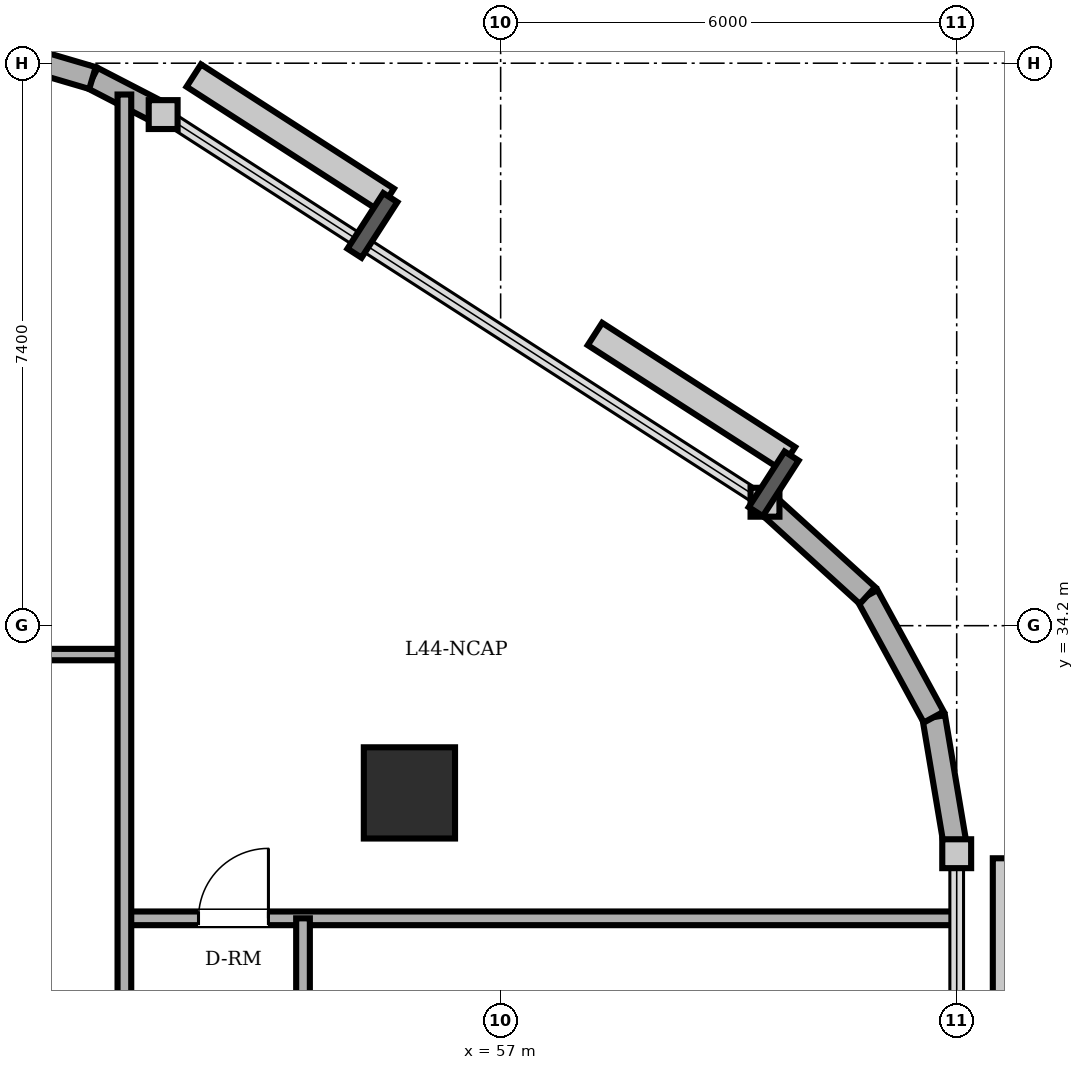
"""IFC4 building model, lengths in metres.
Left out: names, types, materials, properties, quantities, classifications, styles, units other than length and angle.
Written with IfcOpenShell. Run it as: python <this file> out.ifc"""

import sys

from ifc_helpers import new_model, si_unit, direction, frame, frame_2d, origin, origin_2d, place, context, subcontext, project, spatial, rectangle, circle, extrude, element, fill, save


model = new_model("IFC4")
c1 = context("Model", 3, precision=1e-05, world=origin(), true_north=direction((0.0, 1.0)))
c2 = subcontext(c1, "Body", "Model", "MODEL_VIEW")
j1 = project(units=[si_unit("LENGTHUNIT", "METRE"), si_unit("PLANEANGLEUNIT", "RADIAN")], contexts=[c1])
p1 = place(None, origin())
s1 = spatial("IfcSite", under=j1, at=p1, CompositionType="ELEMENT")
p2 = place(p1, origin())
s2 = spatial("IfcBuilding", under=s1, at=p2, CompositionType="ELEMENT")
p3 = place(p2, frame((0.0, 0.0, 169.0)))
s3 = spatial("IfcBuildingStorey", under=s2, at=p3, CompositionType="ELEMENT", Elevation=169.0)
p4 = place(p3, frame((55.8, 32.0, 0.0), z_axis=(0.0, 0.0, 1.0), x_axis=(1.0, 0.0, 0.0)))
e1 = element("IfcColumn", 1, at=p4, inside=s3, PredefinedType="COLUMN", context=c2, shape_type="SweptSolid", body=[
    extrude(circle(Radius=0.6, at=origin_2d()), origin(), (0.0, 0.0, 1.0), 3.6),
])
p5 = place(p3, frame((63.0, 31.2, 0.0), z_axis=(0.0, 0.0, 1.0), x_axis=(-0.165724081207, 0.986172159873, 0.0)))
e2 = element("IfcWall", 2, at=p5, inside=s3, PredefinedType="SOLIDWALL", context=c2, shape_type="SweptSolid", body=[
    extrude(rectangle(XDim=1.822, YDim=0.3, at=frame_2d((0.911, 0.0))), origin(), (0.0, 0.0, 1.0), 3.4),
])
p6 = place(p3, frame((62.698, 32.997, 0.0), z_axis=(0.0, 0.0, 1.0), x_axis=(-0.478608030646, 0.878028674362, 0.0)))
e3 = element("IfcWall", 3, at=p6, inside=s3, PredefinedType="SOLIDWALL", context=c2, shape_type="SweptSolid", body=[
    extrude(rectangle(XDim=1.822, YDim=0.3, at=frame_2d((0.911, 0.0))), origin(), (0.0, 0.0, 1.0), 3.4),
])
p7 = place(p3, frame((61.826, 34.597, 0.0), z_axis=(0.0, 0.0, 1.0), x_axis=(-0.73947929393, 0.673179302897, 0.0)))
e4 = element("IfcWall", 4, at=p7, inside=s3, PredefinedType="SOLIDWALL", context=c2, shape_type="SweptSolid", body=[
    extrude(rectangle(XDim=1.823, YDim=0.3, at=frame_2d((0.911, 0.0))), origin(), (0.0, 0.0, 1.0), 3.4),
])
p8 = place(p3, frame((52.56, 40.924, 0.0), z_axis=(0.0, 0.0, 1.0), x_axis=(-0.888283247196, 0.459296062198, 0.0)))
e5 = element("IfcWall", 5, at=p8, inside=s3, PredefinedType="SOLIDWALL", context=c2, shape_type="SweptSolid", body=[
    extrude(rectangle(XDim=1.047, YDim=0.3, at=frame_2d((0.523, 0.0))), origin(), (0.0, 0.0, 1.0), 3.4),
])
p9 = place(p3, frame((51.63, 41.405, 0.0), z_axis=(0.0, 0.0, 1.0), x_axis=(-0.959528674476, 0.281610942363, 0.0)))
e6 = element("IfcWall", 6, at=p9, inside=s3, PredefinedType="SOLIDWALL", context=c2, shape_type="SweptSolid", body=[
    extrude(rectangle(XDim=1.047, YDim=0.3, at=frame_2d((0.524, 0.0))), origin(), (0.0, 0.0, 1.0), 3.4),
])
p10 = place(p3, frame((52.05, 30.35, 0.0), z_axis=(0.0, 0.0, 1.0), x_axis=(1.0, 0.0, 0.0)))
e7 = element("IfcWall", 7, at=p10, inside=s3, PredefinedType="PARTITIONING", context=c2, shape_type="SweptSolid", body=[
    extrude(rectangle(XDim=10.95, YDim=0.18, at=frame_2d((5.475, 0.0))), origin(), (0.0, 0.0, 1.0), 3.4),
])
p11 = place(p10, frame((0.975, 0.0, 0.0)))
e8 = element("IfcOpeningElement", 8, at=p11, cuts=e7, PredefinedType="OPENING", context=c2, shape_type="SweptSolid", body=[
    extrude(rectangle(XDim=0.92, YDim=2.1, at=frame_2d((0.46, 1.05))), frame((0.0, 0.1, 0.0), z_axis=(0.0, -1.0, 0.0), x_axis=(1.0, 0.0, 0.0)), (0.0, 0.0, 1.0), 0.2),
])
p12 = place(p3, frame((39.85, 33.82, 0.0), z_axis=(0.0, 0.0, 1.0), x_axis=(1.0, 0.0, 0.0)))
e9 = element("IfcWall", 9, at=p12, inside=s3, PredefinedType="PARTITIONING", context=c2, shape_type="SweptSolid", body=[
    extrude(rectangle(XDim=12.2, YDim=0.15, at=frame_2d((6.1, 0.0))), origin(), (0.0, 0.0, 1.0), 2.932),
])
p13 = place(p3, frame((52.05, 14.18, 0.0), z_axis=(0.0, 0.0, 1.0), x_axis=(0.0, 1.0, 0.0)))
e10 = element("IfcWall", 10, at=p13, inside=s3, PredefinedType="PARTITIONING", context=c2, shape_type="SweptSolid", body=[
    extrude(rectangle(XDim=27.008, YDim=0.18, at=frame_2d((13.504, 0.0))), origin(), (0.0, 0.0, 1.0), 3.4),
])
p14 = place(p3, frame((54.4, 8.261, 0.0), z_axis=(0.0, 0.0, 1.0), x_axis=(0.0, 1.0, 0.0)))
e11 = element("IfcWall", 11, at=p14, inside=s3, PredefinedType="PARTITIONING", context=c2, shape_type="SweptSolid", body=[
    extrude(rectangle(XDim=22.089, YDim=0.18, at=frame_2d((11.044, 0.0))), origin(), (0.0, 0.0, 1.0), 3.4),
])
p15 = place(p14, frame((17.694, 0.0, 0.0)))
e12 = element("IfcOpeningElement", 12, at=p15, cuts=e11, PredefinedType="OPENING", context=c2, shape_type="SweptSolid", body=[
    extrude(rectangle(XDim=0.92, YDim=2.1, at=frame_2d((0.46, 1.05))), frame((0.0, 0.1, 0.0), z_axis=(0.0, -1.0, 0.0), x_axis=(1.0, 0.0, 0.0)), (0.0, 0.0, 1.0), 0.2),
])
p16 = place(p14, frame((10.771, 0.0, 0.0)))
e13 = element("IfcOpeningElement", 13, at=p16, cuts=e11, PredefinedType="OPENING", context=c2, shape_type="SweptSolid", body=[
    extrude(rectangle(XDim=0.92, YDim=2.1, at=frame_2d((0.46, 1.05))), frame((0.0, 0.1, 0.0), z_axis=(0.0, -1.0, 0.0), x_axis=(1.0, 0.0, 0.0)), (0.0, 0.0, 1.0), 0.2),
])
p17 = place(p11, origin())
e14 = element("IfcDoor", 14, at=p17, inside=s3, OperationType="SINGLE_SWING_RIGHT", PredefinedType="DOOR", context=c2, shape_type="SweptSolid", body=[
    extrude(rectangle(XDim=0.92, YDim=2.1, at=frame_2d((0.46, 1.05))), frame((0.0, 0.025, 0.0), z_axis=(0.0, -1.0, 0.0), x_axis=(1.0, 0.0, 0.0)), (0.0, 0.0, 1.0), 0.05),
])
fill(e8, e14)
save(model, sys.argv[1])
